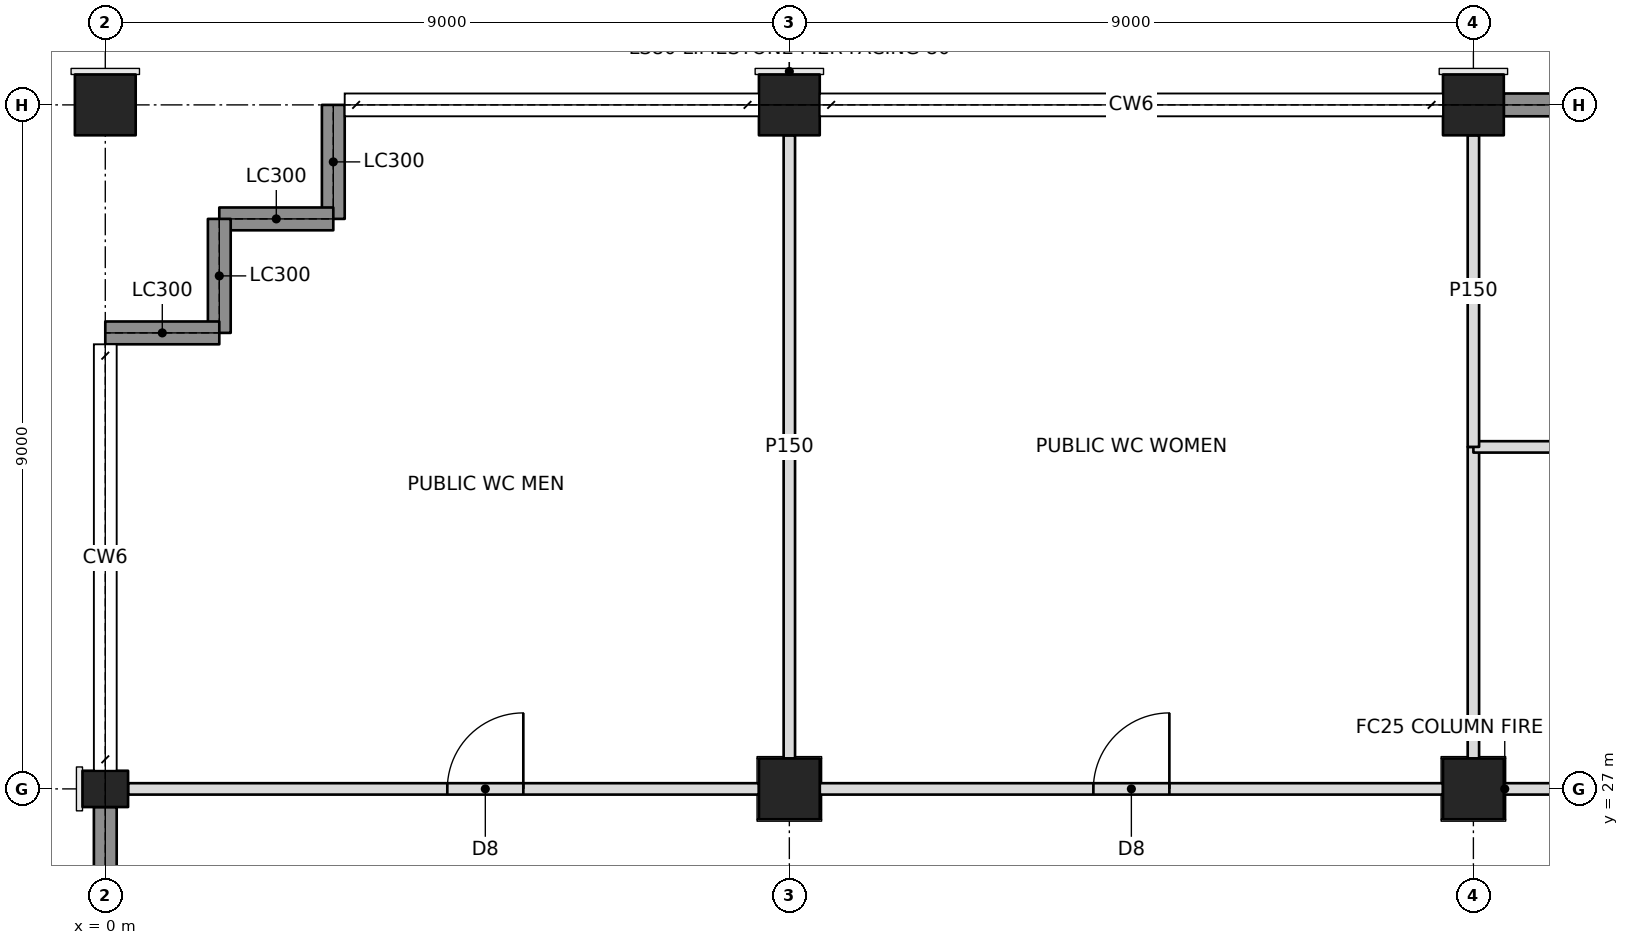
"""IFC4 building model, lengths in metres.
Left out: names, types, materials, properties, quantities, classifications, styles, units other than length and angle.
Written with IfcOpenShell. Run it as: python <this file> out.ifc"""

import sys

from ifc_helpers import new_model, si_unit, direction, frame, frame_2d, origin, origin_2d, place, context, subcontext, project, spatial, rectangle, hollow_rectangle, i_section, extrude, element, fill, save


model = new_model("IFC4")
c1 = context("Model", 3, precision=1e-05, world=origin(), true_north=direction((0.0, 1.0)))
c2 = subcontext(c1, "Body", "Model", "MODEL_VIEW")
j1 = project(units=[si_unit("LENGTHUNIT", "METRE"), si_unit("PLANEANGLEUNIT", "RADIAN")], contexts=[c1])
p1 = place(None, origin())
s1 = spatial("IfcSite", under=j1, at=p1, CompositionType="ELEMENT")
p2 = place(p1, origin())
s2 = spatial("IfcBuilding", under=s1, at=p2, CompositionType="ELEMENT")
p3 = place(p2, frame((0.0, 0.0, 23.0)))
s3 = spatial("IfcBuildingStorey", under=s2, at=p3, CompositionType="ELEMENT", Elevation=23.0)
p4 = place(p3, frame((0.0, 27.0, 0.0), z_axis=(0.0, 0.0, 1.0), x_axis=(0.0, 1.0, 0.0)))
e1 = element("IfcColumn", 1, at=p4, inside=s3, PredefinedType="COLUMN", context=c2, shape_type="SweptSolid", body=[
    extrude(i_section(OverallWidth=0.478, OverallDepth=0.599, WebThickness=0.1, FlangeThickness=0.14, at=origin_2d()), origin(), (0.0, 0.0, 1.0), 5.0),
])
for number, where, z_axis, x_axis in (
    (2, (0.0, 36.0, 0.0), (0.0, 0.0, 1.0), (1.0, 0.0, 0.0)),
    (3, (9.0, 27.0, 0.0), (0.0, 0.0, 1.0), (1.0, 0.0, 0.0)),
    (4, (9.0, 36.0, 0.0), (0.0, 0.0, 1.0), (1.0, 0.0, 0.0)),
    (5, (18.0, 27.0, 0.0), (0.0, 0.0, 1.0), (1.0, 0.0, 0.0)),
    (6, (18.0, 36.0, 0.0), (0.0, 0.0, 1.0), (1.0, 0.0, 0.0)),
):
    element("IfcColumn", number, at=place(p3, frame(where, z_axis=z_axis, x_axis=x_axis)), inside=s3, PredefinedType="COLUMN", context=c2, shape_type="SweptSolid", body=[
        extrude(hollow_rectangle(XDim=0.8, YDim=0.8, WallThickness=0.1, at=origin_2d()), origin(), (0.0, 0.0, 1.0), 5.0),
    ])
p5 = place(p3, frame((3.0, 36.0, 0.0), z_axis=(0.0, 0.0, 1.0), x_axis=(0.0, -1.0, 0.0)))
e7 = element("IfcWall", 7, at=p5, inside=s3, PredefinedType="SOLIDWALL", context=c2, shape_type="SweptSolid", body=[
    extrude(rectangle(XDim=1.5, YDim=0.3, at=frame_2d((0.75, 0.0))), origin(), (0.0, 0.0, 1.0), 4.02),
])
for number, where, z_axis, x_axis in (
    (8, (3.0, 34.5, 0.0), (0.0, 0.0, 1.0), (-1.0, 0.0, 0.0)),
    (9, (1.5, 34.5, 0.0), (0.0, 0.0, 1.0), (0.0, -1.0, 0.0)),
):
    element("IfcWall", number, at=place(p3, frame(where, z_axis=z_axis, x_axis=x_axis)), inside=s3, PredefinedType="SOLIDWALL", context=c2, shape_type="SweptSolid", body=[
        extrude(rectangle(XDim=1.5, YDim=0.3, at=frame_2d((0.75, 0.0))), origin(), (0.0, 0.0, 1.0), 4.8),
    ])
p6 = place(p3, frame((1.5, 33.0, 0.0), z_axis=(0.0, 0.0, 1.0), x_axis=(-1.0, 0.0, 0.0)))
e10 = element("IfcWall", 10, at=p6, inside=s3, PredefinedType="SOLIDWALL", context=c2, shape_type="SweptSolid", body=[
    extrude(rectangle(XDim=1.5, YDim=0.3, at=frame_2d((0.75, 0.0))), origin(), (0.0, 0.0, 1.0), 4.02),
])
p7 = place(p3, frame((0.0, 18.239, 0.0), z_axis=(0.0, 0.0, 1.0), x_axis=(0.0, 1.0, 0.0)))
e11 = element("IfcWall", 11, at=p7, inside=s3, PredefinedType="SOLIDWALL", context=c2, shape_type="SweptSolid", body=[
    extrude(rectangle(XDim=8.522, YDim=0.3, at=frame_2d((4.261, 0.0))), origin(), (0.0, 0.0, 1.0), 4.02),
])
p8 = place(p7, frame((1.231, 0.0, 0.0)))
e12 = element("IfcOpeningElement", 12, at=p8, cuts=e11, PredefinedType="OPENING", context=c2, shape_type="SweptSolid", body=[
    extrude(rectangle(XDim=1.8, YDim=2.4, at=frame_2d((0.9, 1.2))), frame((0.0, 0.16, 0.0), z_axis=(0.0, -1.0, 0.0), x_axis=(1.0, 0.0, 0.0)), (0.0, 0.0, 1.0), 0.32),
])
p9 = place(p7, frame((5.492, 0.0, 0.0)))
e13 = element("IfcOpeningElement", 13, at=p9, cuts=e11, PredefinedType="OPENING", context=c2, shape_type="SweptSolid", body=[
    extrude(rectangle(XDim=1.8, YDim=2.4, at=frame_2d((0.9, 1.2))), frame((0.0, 0.16, 0.0), z_axis=(0.0, -1.0, 0.0), x_axis=(1.0, 0.0, 0.0)), (0.0, 0.0, 1.0), 0.32),
])
p10 = place(p3, frame((18.4, 36.0, 0.0), z_axis=(0.0, 0.0, 1.0), x_axis=(1.0, 0.0, 0.0)))
e14 = element("IfcWall", 14, at=p10, inside=s3, PredefinedType="SOLIDWALL", context=c2, shape_type="SweptSolid", body=[
    extrude(rectangle(XDim=8.2, YDim=0.3, at=frame_2d((4.1, 0.0))), origin(), (0.0, 0.0, 1.0), 4.02),
])
p11 = place(p10, frame((1.15, 0.0, 0.0)))
e15 = element("IfcOpeningElement", 15, at=p11, cuts=e14, PredefinedType="OPENING", context=c2, shape_type="SweptSolid", body=[
    extrude(rectangle(XDim=1.8, YDim=2.4, at=frame_2d((0.9, 1.2))), frame((0.0, 0.16, 0.0), z_axis=(0.0, -1.0, 0.0), x_axis=(1.0, 0.0, 0.0)), (0.0, 0.0, 1.0), 0.32),
])
p12 = place(p10, frame((5.25, 0.0, 0.0)))
e16 = element("IfcOpeningElement", 16, at=p12, cuts=e14, PredefinedType="OPENING", context=c2, shape_type="SweptSolid", body=[
    extrude(rectangle(XDim=1.8, YDim=2.4, at=frame_2d((0.9, 1.2))), frame((0.0, 0.16, 0.0), z_axis=(0.0, -1.0, 0.0), x_axis=(1.0, 0.0, 0.0)), (0.0, 0.0, 1.0), 0.32),
])
p13 = place(p3, frame((8.6, 27.0, 0.0), z_axis=(0.0, 0.0, 1.0), x_axis=(-1.0, 0.0, 0.0)))
e17 = element("IfcWall", 17, at=p13, inside=s3, PredefinedType="PARTITIONING", context=c2, shape_type="SweptSolid", body=[
    extrude(rectangle(XDim=8.3, YDim=0.15, at=frame_2d((4.15, 0.0))), origin(), (0.0, 0.0, 1.0), 4.038),
])
p14 = place(p13, frame((3.1, 0.0, 0.0)))
e18 = element("IfcOpeningElement", 18, at=p14, cuts=e17, PredefinedType="OPENING", context=c2, shape_type="SweptSolid", body=[
    extrude(rectangle(XDim=1.0, YDim=2.1, at=frame_2d((0.5, 1.05))), frame((0.0, 0.085, 0.0), z_axis=(0.0, -1.0, 0.0), x_axis=(1.0, 0.0, 0.0)), (0.0, 0.0, 1.0), 0.17),
])
p15 = place(p3, frame((17.6, 27.0, 0.0), z_axis=(0.0, 0.0, 1.0), x_axis=(-1.0, 0.0, 0.0)))
e19 = element("IfcWall", 19, at=p15, inside=s3, PredefinedType="PARTITIONING", context=c2, shape_type="SweptSolid", body=[
    extrude(rectangle(XDim=8.2, YDim=0.15, at=frame_2d((4.1, 0.0))), origin(), (0.0, 0.0, 1.0), 4.005),
])
p16 = place(p15, frame((3.6, 0.0, 0.0)))
e20 = element("IfcOpeningElement", 20, at=p16, cuts=e19, PredefinedType="OPENING", context=c2, shape_type="SweptSolid", body=[
    extrude(rectangle(XDim=1.0, YDim=2.1, at=frame_2d((0.5, 1.05))), frame((0.0, 0.085, 0.0), z_axis=(0.0, -1.0, 0.0), x_axis=(1.0, 0.0, 0.0)), (0.0, 0.0, 1.0), 0.17),
])
p17 = place(p3, frame((9.0, 35.6, 0.0), z_axis=(0.0, 0.0, 1.0), x_axis=(0.0, -1.0, 0.0)))
e21 = element("IfcWall", 21, at=p17, inside=s3, PredefinedType="PARTITIONING", context=c2, shape_type="SweptSolid", body=[
    extrude(rectangle(XDim=8.2, YDim=0.15, at=frame_2d((4.1, 0.0))), origin(), (0.0, 0.0, 1.0), 4.038),
])
for number, where, z_axis, x_axis in (
    (22, (22.5, 27.0, 0.0), (0.0, 0.0, 1.0), (-1.0, 0.0, 0.0)),
    (23, (18.0, 31.5, 0.0), (0.0, 0.0, 1.0), (0.0, -1.0, 0.0)),
):
    element("IfcWall", number, at=place(p3, frame(where, z_axis=z_axis, x_axis=x_axis)), inside=s3, PredefinedType="PARTITIONING", context=c2, shape_type="SweptSolid", body=[
        extrude(rectangle(XDim=4.1, YDim=0.15, at=frame_2d((2.05, 0.0))), origin(), (0.0, 0.0, 1.0), 4.005),
    ])
p18 = place(p3, frame((18.0, 31.5, 0.0), z_axis=(0.0, 0.0, 1.0), x_axis=(1.0, 0.0, 0.0)))
e24 = element("IfcWall", 24, at=p18, inside=s3, PredefinedType="PARTITIONING", context=c2, shape_type="SweptSolid", body=[
    extrude(rectangle(XDim=4.5, YDim=0.15, at=frame_2d((2.25, 0.0))), origin(), (0.0, 0.0, 1.0), 4.004),
])
p19 = place(p18, frame((1.5, 0.0, 0.0)))
e25 = element("IfcOpeningElement", 25, at=p19, cuts=e24, PredefinedType="OPENING", context=c2, shape_type="SweptSolid", body=[
    extrude(rectangle(XDim=1.0, YDim=2.1, at=frame_2d((0.5, 1.05))), frame((0.0, 0.085, 0.0), z_axis=(0.0, -1.0, 0.0), x_axis=(1.0, 0.0, 0.0)), (0.0, 0.0, 1.0), 0.17),
])
p20 = place(p3, frame((18.0, 35.6, 0.0), z_axis=(0.0, 0.0, 1.0), x_axis=(0.0, -1.0, 0.0)))
e26 = element("IfcWall", 26, at=p20, inside=s3, PredefinedType="PARTITIONING", context=c2, shape_type="SweptSolid", body=[
    extrude(rectangle(XDim=4.1, YDim=0.15, at=frame_2d((2.05, 0.0))), origin(), (0.0, 0.0, 1.0), 4.005),
])
p21 = place(p14, frame((1.0, 0.0, 0.0), z_axis=(0.0, 0.0, 1.0), x_axis=(-1.0, 0.0, 0.0)))
e27 = element("IfcDoor", 27, at=p21, inside=s3, OperationType="SINGLE_SWING_RIGHT", PredefinedType="DOOR", context=c2, shape_type="SweptSolid", body=[
    extrude(rectangle(XDim=1.0, YDim=2.1, at=frame_2d((0.5, 1.05))), frame((0.0, 0.025, 0.0), z_axis=(0.0, -1.0, 0.0), x_axis=(1.0, 0.0, 0.0)), (0.0, 0.0, 1.0), 0.05),
])
fill(e18, e27)
p22 = place(p16, frame((1.0, 0.0, 0.0), z_axis=(0.0, 0.0, 1.0), x_axis=(-1.0, 0.0, 0.0)))
e28 = element("IfcDoor", 28, at=p22, inside=s3, OperationType="SINGLE_SWING_RIGHT", PredefinedType="DOOR", context=c2, shape_type="SweptSolid", body=[
    extrude(rectangle(XDim=1.0, YDim=2.1, at=frame_2d((0.5, 1.05))), frame((0.0, 0.025, 0.0), z_axis=(0.0, -1.0, 0.0), x_axis=(1.0, 0.0, 0.0)), (0.0, 0.0, 1.0), 0.05),
])
fill(e20, e28)
save(model, sys.argv[1])
